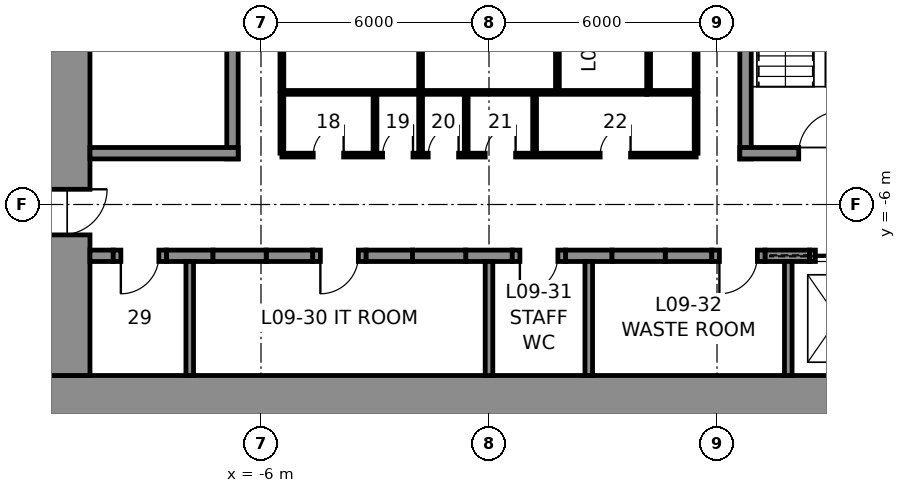
"""IFC4 building model, lengths in metres.
Left out: names, types, materials, properties, quantities, classifications, styles, units other than length and angle.
Written with IfcOpenShell. Run it as: python <this file> out.ifc"""

import sys

from ifc_helpers import new_model, si_unit, direction, frame, frame_2d, origin, place, context, subcontext, project, spatial, rectangle, extrude, element, fill, save


model = new_model("IFC4")
c1 = context("Model", 3, precision=1e-05, world=origin(), true_north=direction((0.0, 1.0)))
c2 = subcontext(c1, "Body", "Model", "MODEL_VIEW")
j1 = project(units=[si_unit("LENGTHUNIT", "METRE"), si_unit("PLANEANGLEUNIT", "RADIAN")], contexts=[c1])
p1 = place(None, origin())
s1 = spatial("IfcSite", under=j1, at=p1, CompositionType="ELEMENT")
p2 = place(p1, origin())
s2 = spatial("IfcBuilding", under=s1, at=p2, CompositionType="ELEMENT")
p3 = place(p2, frame((0.0, 0.0, 48.5)))
s3 = spatial("IfcBuildingStorey", under=s2, at=p3, CompositionType="ELEMENT", Elevation=48.5)
p4 = place(p3, frame((12.0, -11.25, 0.0), z_axis=(0.0, 0.0, 1.0), x_axis=(-1.0, 0.0, 0.0)))
e1 = element("IfcWall", 1, at=p4, inside=s3, PredefinedType="SHEAR", context=c2, shape_type="SweptSolid", body=[
    extrude(rectangle(XDim=24.0, YDim=1.5, at=frame_2d((12.0, 0.0))), origin(), (0.0, 0.0, 1.0), 5.5),
])
p5 = place(p3, frame((-11.25, -10.5, 0.0), z_axis=(0.0, 0.0, 1.0), x_axis=(0.0, 1.0, 0.0)))
e2 = element("IfcWall", 2, at=p5, inside=s3, PredefinedType="SHEAR", context=c2, shape_type="SweptSolid", body=[
    extrude(rectangle(XDim=21.0, YDim=1.5, at=frame_2d((10.5, 0.0))), origin(), (0.0, 0.0, 1.0), 5.5),
])
p6 = place(p5, frame((16.1, 0.0, 0.0)))
e3 = element("IfcOpeningElement", 3, at=p6, cuts=e2, PredefinedType="OPENING", context=c2, shape_type="SweptSolid", body=[
    extrude(rectangle(XDim=1.2, YDim=2.3, at=frame_2d((0.6, 1.15))), frame((0.0, 0.76, 0.0), z_axis=(0.0, -1.0, 0.0), x_axis=(1.0, 0.0, 0.0)), (0.0, 0.0, 1.0), 1.52),
])
p7 = place(p5, frame((3.7, 0.0, 0.0)))
e4 = element("IfcOpeningElement", 4, at=p7, cuts=e2, PredefinedType="OPENING", context=c2, shape_type="SweptSolid", body=[
    extrude(rectangle(XDim=1.2, YDim=2.3, at=frame_2d((0.6, 1.15))), frame((0.0, 0.76, 0.0), z_axis=(0.0, -1.0, 0.0), x_axis=(1.0, 0.0, 0.0)), (0.0, 0.0, 1.0), 1.52),
])
p8 = place(p3, frame((-10.5, -7.35, 0.0), z_axis=(0.0, 0.0, 1.0), x_axis=(1.0, 0.0, 0.0)))
e5 = element("IfcWall", 5, at=p8, inside=s3, PredefinedType="SHEAR", context=c2, shape_type="SweptSolid", body=[
    extrude(rectangle(XDim=0.613, YDim=0.3, at=frame_2d((0.306, 0.0))), origin(), (0.0, 0.0, 1.0), 5.5),
])
for number, where, z_axis, x_axis in (
    (6, (-8.488, -7.35, 0.0), (0.0, 0.0, 1.0), (1.0, 0.0, 0.0)),
    (7, (-5.863, -7.35, 0.0), (0.0, 0.0, 1.0), (1.0, 0.0, 0.0)),
    (8, (-3.238, -7.35, 0.0), (0.0, 0.0, 1.0), (1.0, 0.0, 0.0)),
    (9, (-0.613, -7.35, 0.0), (0.0, 0.0, 1.0), (1.0, 0.0, 0.0)),
    (10, (2.012, -7.35, 0.0), (0.0, 0.0, 1.0), (1.0, 0.0, 0.0)),
    (11, (4.637, -7.35, 0.0), (0.0, 0.0, 1.0), (1.0, 0.0, 0.0)),
):
    element("IfcWall", number, at=place(p3, frame(where, z_axis=z_axis, x_axis=x_axis)), inside=s3, PredefinedType="SHEAR", context=c2, shape_type="SweptSolid", body=[
        extrude(rectangle(XDim=1.225, YDim=0.3, at=frame_2d((0.613, 0.0))), origin(), (0.0, 0.0, 1.0), 5.5),
    ])
p9 = place(p3, frame((7.262, -7.35, 0.0), z_axis=(0.0, 0.0, 1.0), x_axis=(1.0, 0.0, 0.0)))
e12 = element("IfcWall", 12, at=p9, inside=s3, PredefinedType="SHEAR", context=c2, shape_type="SweptSolid", body=[
    extrude(rectangle(XDim=1.175, YDim=0.3, at=frame_2d((0.587, 0.0))), origin(), (0.0, 0.0, 1.0), 5.5),
])
p10 = place(p3, frame((-9.887, -7.35, 0.0), z_axis=(0.0, 0.0, 1.0), x_axis=(1.0, 0.0, 0.0)))
e13 = element("IfcWall", 13, at=p10, inside=s3, PredefinedType="PARTITIONING", context=c2, shape_type="SweptSolid", body=[
    extrude(rectangle(XDim=1.4, YDim=0.3, at=frame_2d((0.7, 0.0))), origin(), (0.0, 0.0, 1.0), 5.5),
])
p11 = place(p10, frame((0.2, 0.0, 0.0)))
e14 = element("IfcOpeningElement", 14, at=p11, cuts=e13, PredefinedType="OPENING", context=c2, shape_type="SweptSolid", body=[
    extrude(rectangle(XDim=1.0, YDim=2.3, at=frame_2d((0.5, 1.15))), frame((0.0, 0.16, 0.0), z_axis=(0.0, -1.0, 0.0), x_axis=(1.0, 0.0, 0.0)), (0.0, 0.0, 1.0), 0.32),
])
p12 = place(p3, frame((-7.262, -7.35, 0.0), z_axis=(0.0, 0.0, 1.0), x_axis=(1.0, 0.0, 0.0)))
e15 = element("IfcWall", 15, at=p12, inside=s3, PredefinedType="PARTITIONING", context=c2, shape_type="SweptSolid", body=[
    extrude(rectangle(XDim=1.4, YDim=0.3, at=frame_2d((0.7, 0.0))), origin(), (0.0, 0.0, 1.0), 5.5),
])
p13 = place(p3, frame((-4.637, -7.35, 0.0), z_axis=(0.0, 0.0, 1.0), x_axis=(1.0, 0.0, 0.0)))
e16 = element("IfcWall", 16, at=p13, inside=s3, PredefinedType="PARTITIONING", context=c2, shape_type="SweptSolid", body=[
    extrude(rectangle(XDim=1.4, YDim=0.3, at=frame_2d((0.7, 0.0))), origin(), (0.0, 0.0, 1.0), 5.5),
])
p14 = place(p13, frame((0.2, 0.0, 0.0)))
e17 = element("IfcOpeningElement", 17, at=p14, cuts=e16, PredefinedType="OPENING", context=c2, shape_type="SweptSolid", body=[
    extrude(rectangle(XDim=1.0, YDim=2.3, at=frame_2d((0.5, 1.15))), frame((0.0, 0.16, 0.0), z_axis=(0.0, -1.0, 0.0), x_axis=(1.0, 0.0, 0.0)), (0.0, 0.0, 1.0), 0.32),
])
p15 = place(p3, frame((-2.012, -7.35, 0.0), z_axis=(0.0, 0.0, 1.0), x_axis=(1.0, 0.0, 0.0)))
e18 = element("IfcWall", 18, at=p15, inside=s3, PredefinedType="PARTITIONING", context=c2, shape_type="SweptSolid", body=[
    extrude(rectangle(XDim=1.4, YDim=0.3, at=frame_2d((0.7, 0.0))), origin(), (0.0, 0.0, 1.0), 5.5),
])
p16 = place(p3, frame((0.613, -7.35, 0.0), z_axis=(0.0, 0.0, 1.0), x_axis=(1.0, 0.0, 0.0)))
e19 = element("IfcWall", 19, at=p16, inside=s3, PredefinedType="PARTITIONING", context=c2, shape_type="SweptSolid", body=[
    extrude(rectangle(XDim=1.4, YDim=0.3, at=frame_2d((0.7, 0.0))), origin(), (0.0, 0.0, 1.0), 5.5),
])
p17 = place(p16, frame((0.2, 0.0, 0.0)))
e20 = element("IfcOpeningElement", 20, at=p17, cuts=e19, PredefinedType="OPENING", context=c2, shape_type="SweptSolid", body=[
    extrude(rectangle(XDim=1.0, YDim=2.3, at=frame_2d((0.5, 1.15))), frame((0.0, 0.16, 0.0), z_axis=(0.0, -1.0, 0.0), x_axis=(1.0, 0.0, 0.0)), (0.0, 0.0, 1.0), 0.32),
])
p18 = place(p3, frame((3.238, -7.35, 0.0), z_axis=(0.0, 0.0, 1.0), x_axis=(1.0, 0.0, 0.0)))
e21 = element("IfcWall", 21, at=p18, inside=s3, PredefinedType="PARTITIONING", context=c2, shape_type="SweptSolid", body=[
    extrude(rectangle(XDim=1.4, YDim=0.3, at=frame_2d((0.7, 0.0))), origin(), (0.0, 0.0, 1.0), 5.5),
])
p19 = place(p3, frame((5.863, -7.35, 0.0), z_axis=(0.0, 0.0, 1.0), x_axis=(1.0, 0.0, 0.0)))
e22 = element("IfcWall", 22, at=p19, inside=s3, PredefinedType="PARTITIONING", context=c2, shape_type="SweptSolid", body=[
    extrude(rectangle(XDim=1.4, YDim=0.3, at=frame_2d((0.7, 0.0))), origin(), (0.0, 0.0, 1.0), 5.5),
])
p20 = place(p19, frame((0.2, 0.0, 0.0)))
e23 = element("IfcOpeningElement", 23, at=p20, cuts=e22, PredefinedType="OPENING", context=c2, shape_type="SweptSolid", body=[
    extrude(rectangle(XDim=1.0, YDim=2.3, at=frame_2d((0.5, 1.15))), frame((0.0, 0.16, 0.0), z_axis=(0.0, -1.0, 0.0), x_axis=(1.0, 0.0, 0.0)), (0.0, 0.0, 1.0), 0.32),
])
p21 = place(p3, frame((8.438, -7.35, 0.0), z_axis=(0.0, 0.0, 1.0), x_axis=(1.0, 0.0, 0.0)))
e24 = element("IfcWall", 24, at=p21, inside=s3, PredefinedType="PARTITIONING", context=c2, shape_type="SweptSolid", body=[
    extrude(rectangle(XDim=1.5, YDim=0.3, at=frame_2d((0.75, 0.0))), origin(), (0.0, 0.0, 1.0), 5.5),
])
p22 = place(p21, frame((0.15, 0.0, 0.0)))
e25 = element("IfcOpeningElement", 25, at=p22, cuts=e24, PredefinedType="OPENING", context=c2, shape_type="SweptSolid", body=[
    extrude(rectangle(XDim=1.2, YDim=2.3, at=frame_2d((0.6, 1.15))), frame((0.0, 0.16, 0.0), z_axis=(0.0, -1.0, 0.0), x_axis=(1.0, 0.0, 0.0)), (0.0, 0.0, 1.0), 0.32),
])
for number, where, z_axis, x_axis in (
    (26, (-7.875, -10.5, 0.0), (0.0, 0.0, 1.0), (0.0, 1.0, 0.0)),
    (27, (0.0, -10.5, 0.0), (0.0, 0.0, 1.0), (0.0, 1.0, 0.0)),
    (28, (2.625, -10.5, 0.0), (0.0, 0.0, 1.0), (0.0, 1.0, 0.0)),
    (29, (7.875, -10.5, 0.0), (0.0, 0.0, 1.0), (0.0, 1.0, 0.0)),
):
    element("IfcWall", number, at=place(p3, frame(where, z_axis=z_axis, x_axis=x_axis)), inside=s3, PredefinedType="PARTITIONING", context=c2, shape_type="SweptSolid", body=[
        extrude(rectangle(XDim=3.0, YDim=0.2, at=frame_2d((1.5, 0.0))), origin(), (0.0, 0.0, 1.0), 5.5),
    ])
p23 = place(p3, frame((-6.75, -4.8, 0.0), z_axis=(0.0, 0.0, 1.0), x_axis=(0.0, 1.0, 0.0)))
e30 = element("IfcWall", 30, at=p23, inside=s3, PredefinedType="SOLIDWALL", context=c2, shape_type="SweptSolid", body=[
    extrude(rectangle(XDim=9.6, YDim=0.3, at=frame_2d((4.8, 0.0))), origin(), (0.0, 0.0, 1.0), 5.25),
])
p24 = place(p3, frame((-6.6, -4.65, 0.0), z_axis=(0.0, 0.0, 1.0), x_axis=(-1.0, 0.0, 0.0)))
e31 = element("IfcWall", 31, at=p24, inside=s3, PredefinedType="SOLIDWALL", context=c2, shape_type="SweptSolid", body=[
    extrude(rectangle(XDim=3.9, YDim=0.3, at=frame_2d((1.95, 0.0))), origin(), (0.0, 0.0, 1.0), 5.25),
])
p25 = place(p3, frame((6.75, -4.8, 0.0), z_axis=(0.0, 0.0, 1.0), x_axis=(0.0, 1.0, 0.0)))
e32 = element("IfcWall", 32, at=p25, inside=s3, PredefinedType="SOLIDWALL", context=c2, shape_type="SweptSolid", body=[
    extrude(rectangle(XDim=9.6, YDim=0.3, at=frame_2d((4.8, 0.0))), origin(), (0.0, 0.0, 1.0), 5.25),
])
p26 = place(p3, frame((10.5, -4.65, 0.0), z_axis=(0.0, 0.0, 1.0), x_axis=(-1.0, 0.0, 0.0)))
e33 = element("IfcWall", 33, at=p26, inside=s3, PredefinedType="SOLIDWALL", context=c2, shape_type="SweptSolid", body=[
    extrude(rectangle(XDim=3.9, YDim=0.3, at=frame_2d((1.95, 0.0))), origin(), (0.0, 0.0, 1.0), 5.25),
])
p27 = place(p26, frame((1.25, 0.0, 0.0)))
e34 = element("IfcOpeningElement", 34, at=p27, cuts=e33, PredefinedType="OPENING", context=c2, shape_type="SweptSolid", body=[
    extrude(rectangle(XDim=1.1, YDim=2.3, at=frame_2d((0.55, 1.15))), frame((0.0, 0.16, 0.0), z_axis=(0.0, -1.0, 0.0), x_axis=(1.0, 0.0, 0.0)), (0.0, 0.0, 1.0), 0.32),
])
p28 = place(p3, frame((4.15, -3.05, 0.0), z_axis=(0.0, 0.0, 1.0), x_axis=(-1.0, 0.0, 0.0)))
e35 = element("IfcWall", 35, at=p28, inside=s3, PredefinedType="PARTITIONING", context=c2, shape_type="SweptSolid", body=[
    extrude(rectangle(XDim=9.6, YDim=0.1, at=frame_2d((4.8, 0.0))), origin(), (0.0, 0.0, 1.0), 5.25),
])
p29 = place(p3, frame((5.45, -3.05, 0.0), z_axis=(0.0, 0.0, 1.0), x_axis=(-1.0, 0.0, 0.0)))
e36 = element("IfcWall", 36, at=p29, inside=s3, PredefinedType="PARTITIONING", context=c2, shape_type="SweptSolid", body=[
    extrude(rectangle(XDim=1.3, YDim=0.1, at=frame_2d((0.65, 0.0))), origin(), (0.0, 0.0, 1.0), 5.25),
])
for number, where, z_axis, x_axis in (
    (37, (5.45, 3.0, 0.0), (0.0, 0.0, 1.0), (0.0, -1.0, 0.0)),
    (38, (-5.45, -3.0, 0.0), (0.0, 0.0, 1.0), (0.0, 1.0, 0.0)),
    (39, (-1.8, -3.0, 0.0), (0.0, 0.0, 1.0), (0.0, 1.0, 0.0)),
    (40, (1.8, -3.0, 0.0), (0.0, 0.0, 1.0), (0.0, 1.0, 0.0)),
    (41, (4.2, -3.0, 0.0), (0.0, 0.0, 1.0), (0.0, 1.0, 0.0)),
):
    element("IfcWall", number, at=place(p3, frame(where, z_axis=z_axis, x_axis=x_axis)), inside=s3, PredefinedType="PARTITIONING", context=c2, shape_type="SweptSolid", body=[
        extrude(rectangle(XDim=6.0, YDim=0.1, at=frame_2d((3.0, 0.0))), origin(), (0.0, 0.0, 1.0), 5.25),
    ])
p30 = place(p3, frame((5.45, -4.7, 0.0), z_axis=(0.0, 0.0, 1.0), x_axis=(-1.0, 0.0, 0.0)))
e42 = element("IfcWall", 42, at=p30, inside=s3, PredefinedType="PARTITIONING", context=c2, shape_type="SweptSolid", body=[
    extrude(rectangle(XDim=10.9, YDim=0.1, at=frame_2d((5.45, 0.0))), origin(), (0.0, 0.0, 1.0), 5.25),
])
p31 = place(p30, frame((9.275, 0.0, 0.0)))
e43 = element("IfcOpeningElement", 43, at=p31, cuts=e42, PredefinedType="OPENING", context=c2, shape_type="SweptSolid", body=[
    extrude(rectangle(XDim=0.8, YDim=2.3, at=frame_2d((0.4, 1.15))), frame((0.0, 0.06, 0.0), z_axis=(0.0, -1.0, 0.0), x_axis=(1.0, 0.0, 0.0)), (0.0, 0.0, 1.0), 0.12),
])
p32 = place(p30, frame((7.45, 0.0, 0.0)))
e44 = element("IfcOpeningElement", 44, at=p32, cuts=e42, PredefinedType="OPENING", context=c2, shape_type="SweptSolid", body=[
    extrude(rectangle(XDim=0.8, YDim=2.3, at=frame_2d((0.4, 1.15))), frame((0.0, 0.06, 0.0), z_axis=(0.0, -1.0, 0.0), x_axis=(1.0, 0.0, 0.0)), (0.0, 0.0, 1.0), 0.12),
])
p33 = place(p30, frame((6.25, 0.0, 0.0)))
e45 = element("IfcOpeningElement", 45, at=p33, cuts=e42, PredefinedType="OPENING", context=c2, shape_type="SweptSolid", body=[
    extrude(rectangle(XDim=0.8, YDim=2.3, at=frame_2d((0.4, 1.15))), frame((0.0, 0.06, 0.0), z_axis=(0.0, -1.0, 0.0), x_axis=(1.0, 0.0, 0.0)), (0.0, 0.0, 1.0), 0.12),
])
p34 = place(p30, frame((4.75, 0.0, 0.0)))
e46 = element("IfcOpeningElement", 46, at=p34, cuts=e42, PredefinedType="OPENING", context=c2, shape_type="SweptSolid", body=[
    extrude(rectangle(XDim=0.8, YDim=2.3, at=frame_2d((0.4, 1.15))), frame((0.0, 0.06, 0.0), z_axis=(0.0, -1.0, 0.0), x_axis=(1.0, 0.0, 0.0)), (0.0, 0.0, 1.0), 0.12),
])
p35 = place(p30, frame((1.725, 0.0, 0.0)))
e47 = element("IfcOpeningElement", 47, at=p35, cuts=e42, PredefinedType="OPENING", context=c2, shape_type="SweptSolid", body=[
    extrude(rectangle(XDim=0.8, YDim=2.3, at=frame_2d((0.4, 1.15))), frame((0.0, 0.06, 0.0), z_axis=(0.0, -1.0, 0.0), x_axis=(1.0, 0.0, 0.0)), (0.0, 0.0, 1.0), 0.12),
])
for number, where, z_axis, x_axis in (
    (48, (-5.45, -3.1, 0.0), (0.0, 0.0, 1.0), (0.0, -1.0, 0.0)),
    (49, (5.45, -3.1, 0.0), (0.0, 0.0, 1.0), (0.0, -1.0, 0.0)),
    (50, (-3.0, -3.1, 0.0), (0.0, 0.0, 1.0), (0.0, -1.0, 0.0)),
    (51, (-1.8, -3.1, 0.0), (0.0, 0.0, 1.0), (0.0, -1.0, 0.0)),
    (52, (-0.6, -3.1, 0.0), (0.0, 0.0, 1.0), (0.0, -1.0, 0.0)),
    (53, (1.2, -3.1, 0.0), (0.0, 0.0, 1.0), (0.0, -1.0, 0.0)),
):
    element("IfcWall", number, at=place(p3, frame(where, z_axis=z_axis, x_axis=x_axis)), inside=s3, PredefinedType="PARTITIONING", context=c2, shape_type="SweptSolid", body=[
        extrude(rectangle(XDim=1.55, YDim=0.1, at=frame_2d((0.775, 0.0))), origin(), (0.0, 0.0, 1.0), 5.25),
    ])
p36 = place(p27, frame((1.1, 0.0, 0.0), z_axis=(0.0, 0.0, 1.0), x_axis=(-1.0, 0.0, 0.0)))
e54 = element("IfcDoor", 54, at=p36, inside=s3, OperationType="SINGLE_SWING_RIGHT", PredefinedType="DOOR", context=c2, shape_type="SweptSolid", body=[
    extrude(rectangle(XDim=1.1, YDim=2.3, at=frame_2d((0.55, 1.15))), frame((0.0, 0.025, 0.0), z_axis=(0.0, -1.0, 0.0), x_axis=(1.0, 0.0, 0.0)), (0.0, 0.0, 1.0), 0.05),
])
fill(e34, e54)
p37 = place(p31, frame((0.8, 0.0, 0.0), z_axis=(0.0, 0.0, 1.0), x_axis=(-1.0, 0.0, 0.0)))
e55 = element("IfcDoor", 55, at=p37, inside=s3, OperationType="SINGLE_SWING_RIGHT", PredefinedType="DOOR", context=c2, shape_type="SweptSolid", body=[
    extrude(rectangle(XDim=0.8, YDim=2.3, at=frame_2d((0.4, 1.15))), frame((0.0, 0.025, 0.0), z_axis=(0.0, -1.0, 0.0), x_axis=(1.0, 0.0, 0.0)), (0.0, 0.0, 1.0), 0.05),
])
fill(e43, e55)
p38 = place(p32, frame((0.8, 0.0, 0.0), z_axis=(0.0, 0.0, 1.0), x_axis=(-1.0, 0.0, 0.0)))
e56 = element("IfcDoor", 56, at=p38, inside=s3, OperationType="SINGLE_SWING_RIGHT", PredefinedType="DOOR", context=c2, shape_type="SweptSolid", body=[
    extrude(rectangle(XDim=0.8, YDim=2.3, at=frame_2d((0.4, 1.15))), frame((0.0, 0.025, 0.0), z_axis=(0.0, -1.0, 0.0), x_axis=(1.0, 0.0, 0.0)), (0.0, 0.0, 1.0), 0.05),
])
fill(e44, e56)
p39 = place(p33, frame((0.8, 0.0, 0.0), z_axis=(0.0, 0.0, 1.0), x_axis=(-1.0, 0.0, 0.0)))
e57 = element("IfcDoor", 57, at=p39, inside=s3, OperationType="SINGLE_SWING_RIGHT", PredefinedType="DOOR", context=c2, shape_type="SweptSolid", body=[
    extrude(rectangle(XDim=0.8, YDim=2.3, at=frame_2d((0.4, 1.15))), frame((0.0, 0.025, 0.0), z_axis=(0.0, -1.0, 0.0), x_axis=(1.0, 0.0, 0.0)), (0.0, 0.0, 1.0), 0.05),
])
fill(e45, e57)
p40 = place(p34, frame((0.8, 0.0, 0.0), z_axis=(0.0, 0.0, 1.0), x_axis=(-1.0, 0.0, 0.0)))
e58 = element("IfcDoor", 58, at=p40, inside=s3, OperationType="SINGLE_SWING_RIGHT", PredefinedType="DOOR", context=c2, shape_type="SweptSolid", body=[
    extrude(rectangle(XDim=0.8, YDim=2.3, at=frame_2d((0.4, 1.15))), frame((0.0, 0.025, 0.0), z_axis=(0.0, -1.0, 0.0), x_axis=(1.0, 0.0, 0.0)), (0.0, 0.0, 1.0), 0.05),
])
fill(e46, e58)
p41 = place(p35, frame((0.8, 0.0, 0.0), z_axis=(0.0, 0.0, 1.0), x_axis=(-1.0, 0.0, 0.0)))
e59 = element("IfcDoor", 59, at=p41, inside=s3, OperationType="SINGLE_SWING_RIGHT", PredefinedType="DOOR", context=c2, shape_type="SweptSolid", body=[
    extrude(rectangle(XDim=0.8, YDim=2.3, at=frame_2d((0.4, 1.15))), frame((0.0, 0.025, 0.0), z_axis=(0.0, -1.0, 0.0), x_axis=(1.0, 0.0, 0.0)), (0.0, 0.0, 1.0), 0.05),
])
fill(e47, e59)
p42 = place(p11, frame((1.0, 0.0, 0.0), z_axis=(0.0, 0.0, 1.0), x_axis=(-1.0, 0.0, 0.0)))
e60 = element("IfcDoor", 60, at=p42, inside=s3, OperationType="SINGLE_SWING_RIGHT", PredefinedType="DOOR", context=c2, shape_type="SweptSolid", body=[
    extrude(rectangle(XDim=1.0, YDim=2.3, at=frame_2d((0.5, 1.15))), frame((0.0, 0.025, 0.0), z_axis=(0.0, -1.0, 0.0), x_axis=(1.0, 0.0, 0.0)), (0.0, 0.0, 1.0), 0.05),
])
fill(e14, e60)
p43 = place(p14, frame((1.0, 0.0, 0.0), z_axis=(0.0, 0.0, 1.0), x_axis=(-1.0, 0.0, 0.0)))
e61 = element("IfcDoor", 61, at=p43, inside=s3, OperationType="SINGLE_SWING_RIGHT", PredefinedType="DOOR", context=c2, shape_type="SweptSolid", body=[
    extrude(rectangle(XDim=1.0, YDim=2.3, at=frame_2d((0.5, 1.15))), frame((0.0, 0.025, 0.0), z_axis=(0.0, -1.0, 0.0), x_axis=(1.0, 0.0, 0.0)), (0.0, 0.0, 1.0), 0.05),
])
fill(e17, e61)
p44 = place(p17, frame((1.0, 0.0, 0.0), z_axis=(0.0, 0.0, 1.0), x_axis=(-1.0, 0.0, 0.0)))
e62 = element("IfcDoor", 62, at=p44, inside=s3, OperationType="SINGLE_SWING_RIGHT", PredefinedType="DOOR", context=c2, shape_type="SweptSolid", body=[
    extrude(rectangle(XDim=1.0, YDim=2.3, at=frame_2d((0.5, 1.15))), frame((0.0, 0.025, 0.0), z_axis=(0.0, -1.0, 0.0), x_axis=(1.0, 0.0, 0.0)), (0.0, 0.0, 1.0), 0.05),
])
fill(e20, e62)
p45 = place(p20, frame((1.0, 0.0, 0.0), z_axis=(0.0, 0.0, 1.0), x_axis=(-1.0, 0.0, 0.0)))
e63 = element("IfcDoor", 63, at=p45, inside=s3, OperationType="SINGLE_SWING_RIGHT", PredefinedType="DOOR", context=c2, shape_type="SweptSolid", body=[
    extrude(rectangle(XDim=1.0, YDim=2.3, at=frame_2d((0.5, 1.15))), frame((0.0, 0.025, 0.0), z_axis=(0.0, -1.0, 0.0), x_axis=(1.0, 0.0, 0.0)), (0.0, 0.0, 1.0), 0.05),
])
fill(e23, e63)
p46 = place(p7, frame((1.2, 0.0, 0.0), z_axis=(0.0, 0.0, 1.0), x_axis=(-1.0, 0.0, 0.0)))
e64 = element("IfcDoor", 64, at=p46, inside=s3, OperationType="SINGLE_SWING_LEFT", PredefinedType="DOOR", context=c2, shape_type="SweptSolid", body=[
    extrude(rectangle(XDim=1.2, YDim=2.3, at=frame_2d((0.6, 1.15))), frame((0.0, 0.025, 0.0), z_axis=(0.0, -1.0, 0.0), x_axis=(1.0, 0.0, 0.0)), (0.0, 0.0, 1.0), 0.05),
])
fill(e4, e64)
p47 = place(p22, origin())
e65 = element("IfcDoor", 65, at=p47, inside=s3, OperationType="SLIDING_TO_LEFT", PredefinedType="DOOR", context=c2, shape_type="SweptSolid", body=[
    extrude(rectangle(XDim=1.2, YDim=2.3, at=frame_2d((0.6, 1.15))), frame((0.0, 0.025, 0.0), z_axis=(0.0, -1.0, 0.0), x_axis=(1.0, 0.0, 0.0)), (0.0, 0.0, 1.0), 0.05),
])
fill(e25, e65)
save(model, sys.argv[1])
